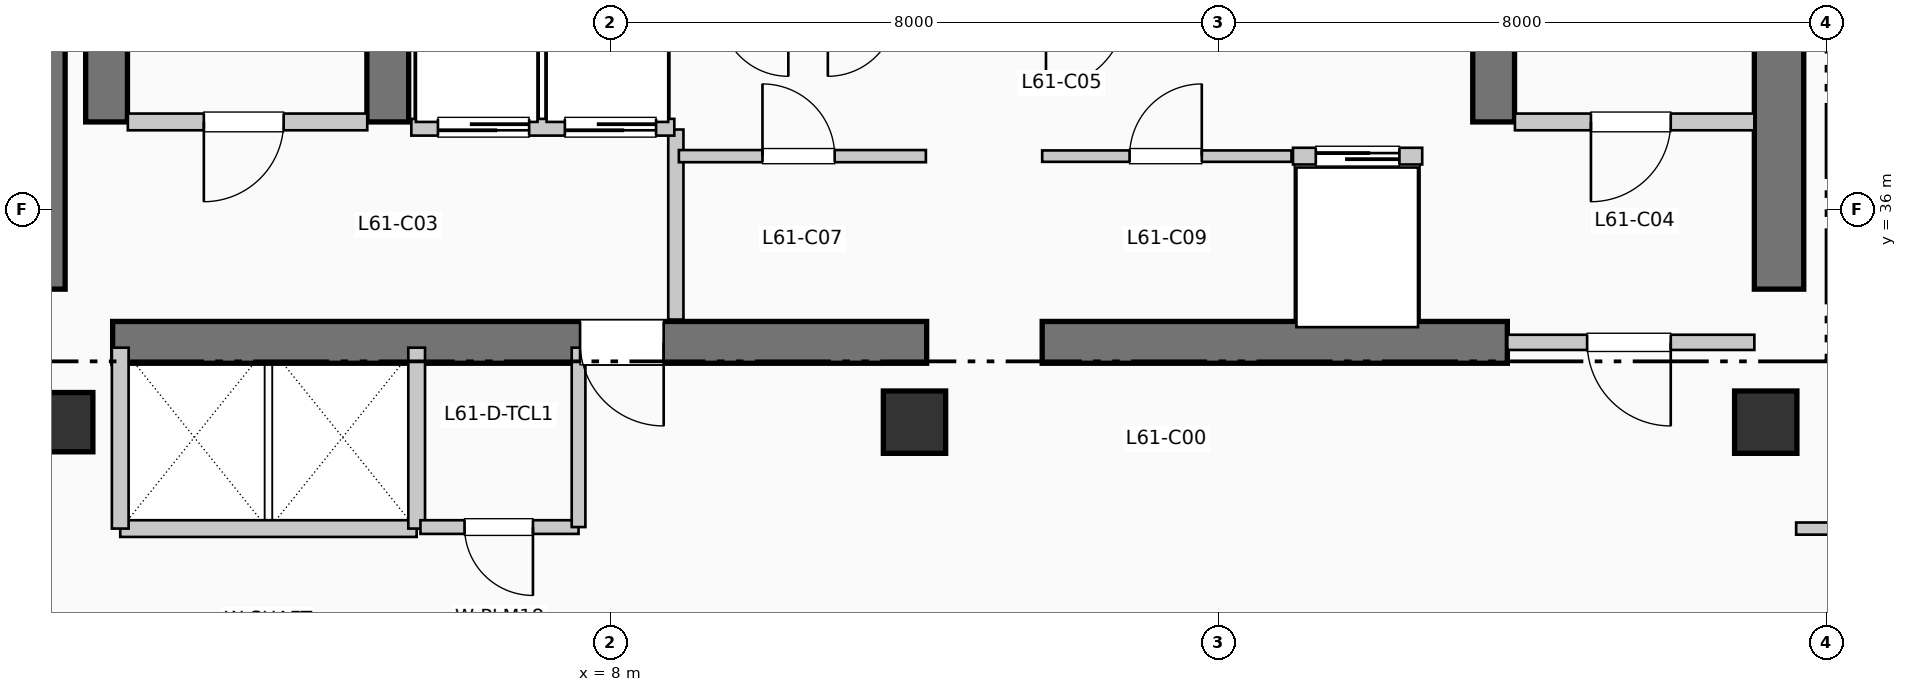
"""IFC4 building model, lengths in metres.
Left out: names, types, materials, properties, quantities, classifications, styles, units other than length and angle.
Written with IfcOpenShell. Run it as: python <this file> out.ifc"""

import sys

from ifc_helpers import new_model, si_unit, direction, frame, frame_2d, origin, origin_2d, place, context, subcontext, project, spatial, rectangle, extrude, element, fill, save


model = new_model("IFC4")
c1 = context("Model", 3, precision=1e-05, world=origin(), true_north=direction((0.0, 1.0)))
c2 = subcontext(c1, "Body", "Model", "MODEL_VIEW")
j1 = project(units=[si_unit("LENGTHUNIT", "METRE"), si_unit("PLANEANGLEUNIT", "RADIAN")], contexts=[c1])
p1 = place(None, origin())
s1 = spatial("IfcSite", under=j1, at=p1, CompositionType="ELEMENT")
p2 = place(p1, origin())
s2 = spatial("IfcBuilding", under=s1, at=p2, CompositionType="ELEMENT")
p3 = place(p2, frame((0.0, 0.0, 251.46)))
s3 = spatial("IfcBuildingStorey", under=s2, at=p3, CompositionType="ELEMENT", Elevation=251.46)
p4 = place(p3, frame((0.5, 34.95, 0.0), z_axis=(0.0, 0.0, 1.0), x_axis=(0.0, 1.0, 0.0)))
e1 = element("IfcWall", 1, at=p4, inside=s3, PredefinedType="SHEAR", context=c2, shape_type="SweptSolid", body=[
    extrude(rectangle(XDim=7.9, YDim=0.65, at=frame_2d((3.95, 0.0))), origin(), (0.0, 0.0, 1.0), 4.95),
])
p5 = place(p3, frame((23.375, 34.95, 0.0), z_axis=(0.0, 0.0, 1.0), x_axis=(0.0, 1.0, 0.0)))
e2 = element("IfcWall", 2, at=p5, inside=s3, PredefinedType="SHEAR", context=c2, shape_type="SweptSolid", body=[
    extrude(rectangle(XDim=10.64, YDim=0.65, at=frame_2d((5.32, 0.0))), origin(), (0.0, 0.0, 1.0), 4.95),
])
p6 = place(p3, frame((1.45, 34.25, 0.0), z_axis=(0.0, 0.0, 1.0), x_axis=(1.0, 0.0, 0.0)))
e3 = element("IfcWall", 3, at=p6, inside=s3, PredefinedType="SHEAR", context=c2, shape_type="SweptSolid", body=[
    extrude(rectangle(XDim=10.71, YDim=0.55, at=frame_2d((5.355, 0.0))), origin(), (0.0, 0.0, 1.0), 4.95),
])
p7 = place(p6, frame((7.25, 0.0, 0.0), z_axis=(0.0, 0.0, 1.0), x_axis=(-1.0, 0.0, 0.0)))
e4 = element("IfcOpeningElement", 4, at=p7, cuts=e3, PredefinedType="OPENING", context=c2, shape_type="SweptSolid", body=[
    extrude(rectangle(XDim=1.1, YDim=2.15, at=frame_2d((0.55, 1.075))), frame((0.0, 0.285, 0.0), z_axis=(0.0, -1.0, 0.0), x_axis=(1.0, 0.0, 0.0)), (0.0, 0.0, 1.0), 0.57),
])
p8 = place(p3, frame((13.68, 34.25, 0.0), z_axis=(0.0, 0.0, 1.0), x_axis=(1.0, 0.0, 0.0)))
e5 = element("IfcWall", 5, at=p8, inside=s3, PredefinedType="SHEAR", context=c2, shape_type="SweptSolid", body=[
    extrude(rectangle(XDim=6.12, YDim=0.55, at=frame_2d((3.06, 0.0))), origin(), (0.0, 0.0, 1.0), 4.95),
])
for number, where, z_axis, x_axis in (
    (6, (1.37, 37.15, 0.0), (0.0, 0.0, 1.0), (0.0, 1.0, 0.0)),
    (7, (5.07, 37.15, 0.0), (0.0, 0.0, 1.0), (0.0, 1.0, 0.0)),
    (8, (19.62, 37.15, 0.0), (0.0, 0.0, 1.0), (0.0, 1.0, 0.0)),
):
    element("IfcWall", number, at=place(p3, frame(where, z_axis=z_axis, x_axis=x_axis)), inside=s3, PredefinedType="SHEAR", context=c2, shape_type="SweptSolid", body=[
        extrude(rectangle(XDim=7.89, YDim=0.55, at=frame_2d((3.945, 0.0))), origin(), (0.0, 0.0, 1.0), 4.95),
    ])
p9 = place(p3, frame((0.8, 33.2, 0.0), z_axis=(0.0, 0.0, 1.0), x_axis=(1.0, 0.0, 0.0)))
e9 = element("IfcColumn", 9, at=p9, inside=s3, PredefinedType="COLUMN", context=c2, shape_type="SweptSolid", body=[
    extrude(rectangle(XDim=0.78, YDim=0.78, at=origin_2d()), origin(), (0.0, 0.0, 1.0), 4.95),
])
for number, where, z_axis, x_axis in (
    (10, (12.0, 33.2, 0.0), (0.0, 0.0, 1.0), (1.0, 0.0, 0.0)),
    (11, (23.2, 33.2, 0.0), (0.0, 0.0, 1.0), (1.0, 0.0, 0.0)),
):
    element("IfcColumn", number, at=place(p3, frame(where, z_axis=z_axis, x_axis=x_axis)), inside=s3, PredefinedType="COLUMN", context=c2, shape_type="SweptSolid", body=[
        extrude(rectangle(XDim=0.82, YDim=0.82, at=origin_2d()), origin(), (0.0, 0.0, 1.0), 4.95),
    ])
p10 = place(p3, frame((1.65, 37.15, 0.0), z_axis=(0.0, 0.0, 1.0), x_axis=(1.0, 0.0, 0.0)))
e12 = element("IfcWall", 12, at=p10, inside=s3, PredefinedType="PARTITIONING", context=c2, shape_type="SweptSolid", body=[
    extrude(rectangle(XDim=3.15, YDim=0.22, at=frame_2d((1.575, 0.0))), origin(), (0.0, 0.0, 1.0), 4.7),
])
p11 = place(p10, frame((2.05, 0.0, 0.0), z_axis=(0.0, 0.0, 1.0), x_axis=(-1.0, 0.0, 0.0)))
e13 = element("IfcOpeningElement", 13, at=p11, cuts=e12, PredefinedType="OPENING", context=c2, shape_type="SweptSolid", body=[
    extrude(rectangle(XDim=1.05, YDim=2.15, at=frame_2d((0.525, 1.075))), frame((0.0, 0.12, 0.0), z_axis=(0.0, -1.0, 0.0), x_axis=(1.0, 0.0, 0.0)), (0.0, 0.0, 1.0), 0.24),
])
p12 = place(p3, frame((8.86, 34.55, 0.0), z_axis=(0.0, 0.0, 1.0), x_axis=(0.0, 1.0, 0.0)))
e14 = element("IfcWall", 14, at=p12, inside=s3, PredefinedType="PARTITIONING", context=c2, shape_type="SweptSolid", body=[
    extrude(rectangle(XDim=2.5, YDim=0.2, at=frame_2d((1.25, 0.0))), origin(), (0.0, 0.0, 1.0), 4.7),
])
p13 = place(p3, frame((19.9, 37.15, 0.0), z_axis=(0.0, 0.0, 1.0), x_axis=(1.0, 0.0, 0.0)))
e15 = element("IfcWall", 15, at=p13, inside=s3, PredefinedType="PARTITIONING", context=c2, shape_type="SweptSolid", body=[
    extrude(rectangle(XDim=3.15, YDim=0.22, at=frame_2d((1.575, 0.0))), origin(), (0.0, 0.0, 1.0), 4.7),
])
p14 = place(p13, frame((2.05, 0.0, 0.0), z_axis=(0.0, 0.0, 1.0), x_axis=(-1.0, 0.0, 0.0)))
e16 = element("IfcOpeningElement", 16, at=p14, cuts=e15, PredefinedType="OPENING", context=c2, shape_type="SweptSolid", body=[
    extrude(rectangle(XDim=1.05, YDim=2.15, at=frame_2d((0.525, 1.075))), frame((0.0, 0.12, 0.0), z_axis=(0.0, -1.0, 0.0), x_axis=(1.0, 0.0, 0.0)), (0.0, 0.0, 1.0), 0.24),
])
p15 = place(p3, frame((19.8, 34.25, 0.0), z_axis=(0.0, 0.0, 1.0), x_axis=(1.0, 0.0, 0.0)))
e17 = element("IfcWall", 17, at=p15, inside=s3, PredefinedType="PARTITIONING", context=c2, shape_type="SweptSolid", body=[
    extrude(rectangle(XDim=3.25, YDim=0.2, at=frame_2d((1.625, 0.0))), origin(), (0.0, 0.0, 1.0), 4.7),
])
p16 = place(p15, frame((2.15, 0.0, 0.0), z_axis=(0.0, 0.0, 1.0), x_axis=(-1.0, 0.0, 0.0)))
e18 = element("IfcOpeningElement", 18, at=p16, cuts=e17, PredefinedType="OPENING", context=c2, shape_type="SweptSolid", body=[
    extrude(rectangle(XDim=1.1, YDim=2.15, at=frame_2d((0.55, 1.075))), frame((0.0, 0.11, 0.0), z_axis=(0.0, -1.0, 0.0), x_axis=(1.0, 0.0, 0.0)), (0.0, 0.0, 1.0), 0.22),
])
p17 = place(p3, frame((5.38, 37.08, 0.0), z_axis=(0.0, 0.0, 1.0), x_axis=(1.0, 0.0, 0.0)))
e19 = element("IfcWall", 19, at=p17, inside=s3, PredefinedType="PARTITIONING", context=c2, shape_type="SweptSolid", body=[
    extrude(rectangle(XDim=3.46, YDim=0.22, at=frame_2d((1.73, 0.0))), origin(), (0.0, 0.0, 1.0), 4.7),
])
p18 = place(p17, frame((1.55, 0.0, 0.0), z_axis=(0.0, 0.0, 1.0), x_axis=(-1.0, 0.0, 0.0)))
e20 = element("IfcOpeningElement", 20, at=p18, cuts=e19, PredefinedType="OPENING", context=c2, shape_type="SweptSolid", body=[
    extrude(rectangle(XDim=1.2, YDim=2.2, at=frame_2d((0.6, 1.1))), frame((0.0, 0.12, 0.0), z_axis=(0.0, -1.0, 0.0), x_axis=(1.0, 0.0, 0.0)), (0.0, 0.0, 1.0), 0.24),
])
p19 = place(p17, frame((3.22, 0.0, 0.0), z_axis=(0.0, 0.0, 1.0), x_axis=(-1.0, 0.0, 0.0)))
e21 = element("IfcOpeningElement", 21, at=p19, cuts=e19, PredefinedType="OPENING", context=c2, shape_type="SweptSolid", body=[
    extrude(rectangle(XDim=1.2, YDim=2.2, at=frame_2d((0.6, 1.1))), frame((0.0, 0.12, 0.0), z_axis=(0.0, -1.0, 0.0), x_axis=(1.0, 0.0, 0.0)), (0.0, 0.0, 1.0), 0.24),
])
p20 = place(p3, frame((1.55, 31.8, 0.0), z_axis=(0.0, 0.0, 1.0), x_axis=(1.0, 0.0, 0.0)))
e22 = element("IfcWall", 22, at=p20, inside=s3, PredefinedType="PARTITIONING", context=c2, shape_type="SweptSolid", body=[
    extrude(rectangle(XDim=3.9, YDim=0.22, at=frame_2d((1.95, 0.0))), origin(), (0.0, 0.0, 1.0), 4.7),
])
for number, where, z_axis, x_axis in (
    (23, (1.55, 31.8, 0.0), (0.0, 0.0, 1.0), (0.0, 1.0, 0.0)),
    (24, (5.45, 31.8, 0.0), (0.0, 0.0, 1.0), (0.0, 1.0, 0.0)),
):
    element("IfcWall", number, at=place(p3, frame(where, z_axis=z_axis, x_axis=x_axis)), inside=s3, PredefinedType="PARTITIONING", context=c2, shape_type="SweptSolid", body=[
        extrude(rectangle(XDim=2.38, YDim=0.22, at=frame_2d((1.19, 0.0))), origin(), (0.0, 0.0, 1.0), 4.7),
    ])
p21 = place(p3, frame((5.5, 31.82, 0.0), z_axis=(0.0, 0.0, 1.0), x_axis=(1.0, 0.0, 0.0)))
e25 = element("IfcWall", 25, at=p21, inside=s3, PredefinedType="PLUMBINGWALL", context=c2, shape_type="SweptSolid", body=[
    extrude(rectangle(XDim=2.08, YDim=0.18, at=frame_2d((1.04, 0.0))), origin(), (0.0, 0.0, 1.0), 4.7),
])
p22 = place(p21, frame((1.48, 0.0, 0.0), z_axis=(0.0, 0.0, 1.0), x_axis=(-1.0, 0.0, 0.0)))
e26 = element("IfcOpeningElement", 26, at=p22, cuts=e25, PredefinedType="OPENING", context=c2, shape_type="SweptSolid", body=[
    extrude(rectangle(XDim=0.9, YDim=2.1, at=frame_2d((0.45, 1.05))), frame((0.0, 0.1, 0.0), z_axis=(0.0, -1.0, 0.0), x_axis=(1.0, 0.0, 0.0)), (0.0, 0.0, 1.0), 0.2),
])
p23 = place(p3, frame((7.58, 31.82, 0.0), z_axis=(0.0, 0.0, 1.0), x_axis=(0.0, 1.0, 0.0)))
e27 = element("IfcWall", 27, at=p23, inside=s3, PredefinedType="PLUMBINGWALL", context=c2, shape_type="SweptSolid", body=[
    extrude(rectangle(XDim=2.36, YDim=0.18, at=frame_2d((1.18, 0.0))), origin(), (0.0, 0.0, 1.0), 4.7),
])
p24 = place(p3, frame((8.9, 36.7, 0.0), z_axis=(0.0, 0.0, 1.0), x_axis=(1.0, 0.0, 0.0)))
e28 = element("IfcWall", 28, at=p24, inside=s3, PredefinedType="PARTITIONING", context=c2, shape_type="SweptSolid", body=[
    extrude(rectangle(XDim=3.25, YDim=0.16, at=frame_2d((1.625, 0.0))), origin(), (0.0, 0.0, 1.0), 4.7),
])
p25 = place(p24, frame((1.1, 0.0, 0.0)))
e29 = element("IfcOpeningElement", 29, at=p25, cuts=e28, PredefinedType="OPENING", context=c2, shape_type="SweptSolid", body=[
    extrude(rectangle(XDim=0.95, YDim=2.15, at=frame_2d((0.475, 1.075))), frame((0.0, 0.09, 0.0), z_axis=(0.0, -1.0, 0.0), x_axis=(1.0, 0.0, 0.0)), (0.0, 0.0, 1.0), 0.18),
])
p26 = place(p3, frame((13.68, 36.7, 0.0), z_axis=(0.0, 0.0, 1.0), x_axis=(1.0, 0.0, 0.0)))
e30 = element("IfcWall", 30, at=p26, inside=s3, PredefinedType="PARTITIONING", context=c2, shape_type="SweptSolid", body=[
    extrude(rectangle(XDim=3.28, YDim=0.15, at=frame_2d((1.64, 0.0))), origin(), (0.0, 0.0, 1.0), 4.7),
])
p27 = place(p26, frame((1.15, 0.0, 0.0)))
e31 = element("IfcOpeningElement", 31, at=p27, cuts=e30, PredefinedType="OPENING", context=c2, shape_type="SweptSolid", body=[
    extrude(rectangle(XDim=0.95, YDim=2.15, at=frame_2d((0.475, 1.075))), frame((0.0, 0.085, 0.0), z_axis=(0.0, -1.0, 0.0), x_axis=(1.0, 0.0, 0.0)), (0.0, 0.0, 1.0), 0.17),
])
p28 = place(p3, frame((16.98, 36.7, 0.0), z_axis=(0.0, 0.0, 1.0), x_axis=(1.0, 0.0, 0.0)))
e32 = element("IfcWall", 32, at=p28, inside=s3, PredefinedType="PARTITIONING", context=c2, shape_type="SweptSolid", body=[
    extrude(rectangle(XDim=1.7, YDim=0.22, at=frame_2d((0.85, 0.0))), origin(), (0.0, 0.0, 1.0), 4.7),
])
p29 = place(p28, frame((0.3, 0.0, 0.0)))
e33 = element("IfcOpeningElement", 33, at=p29, cuts=e32, PredefinedType="OPENING", context=c2, shape_type="SweptSolid", body=[
    extrude(rectangle(XDim=1.1, YDim=2.2, at=frame_2d((0.55, 1.1))), frame((0.0, 0.12, 0.0), z_axis=(0.0, -1.0, 0.0), x_axis=(1.0, 0.0, 0.0)), (0.0, 0.0, 1.0), 0.24),
])
p30 = place(p3, frame((23.6, 31.8, 0.0), z_axis=(0.0, 0.0, 1.0), x_axis=(1.0, 0.0, 0.0)))
e34 = element("IfcWall", 34, at=p30, inside=s3, PredefinedType="PARTITIONING", context=c2, shape_type="SweptSolid", body=[
    extrude(rectangle(XDim=25.45, YDim=0.16, at=frame_2d((12.725, 0.0))), origin(), (0.0, 0.0, 1.0), 4.7),
])
p31 = place(p30, frame((2.5, 0.0, 0.0)))
e35 = element("IfcOpeningElement", 35, at=p31, cuts=e34, PredefinedType="OPENING", context=c2, shape_type="SweptSolid", body=[
    extrude(rectangle(XDim=0.95, YDim=2.1, at=frame_2d((0.475, 1.05))), frame((0.0, 0.09, 0.0), z_axis=(0.0, -1.0, 0.0), x_axis=(1.0, 0.0, 0.0)), (0.0, 0.0, 1.0), 0.18),
])
p32 = place(p30, frame((14.725, 0.0, 0.0)))
e36 = element("IfcOpeningElement", 36, at=p32, cuts=e34, PredefinedType="OPENING", context=c2, shape_type="SweptSolid", body=[
    extrude(rectangle(XDim=0.95, YDim=2.1, at=frame_2d((0.475, 1.05))), frame((0.0, 0.09, 0.0), z_axis=(0.0, -1.0, 0.0), x_axis=(1.0, 0.0, 0.0)), (0.0, 0.0, 1.0), 0.18),
])
p33 = place(p11, origin())
e37 = element("IfcDoor", 37, at=p33, inside=s3, OperationType="SINGLE_SWING_LEFT", PredefinedType="DOOR", context=c2, shape_type="SweptSolid", body=[
    extrude(rectangle(XDim=1.05, YDim=2.15, at=frame_2d((0.525, 1.075))), frame((0.0, 0.025, 0.0), z_axis=(0.0, -1.0, 0.0), x_axis=(1.0, 0.0, 0.0)), (0.0, 0.0, 1.0), 0.05),
])
fill(e13, e37)
p34 = place(p7, origin())
e38 = element("IfcDoor", 38, at=p34, inside=s3, OperationType="SINGLE_SWING_RIGHT", PredefinedType="DOOR", context=c2, shape_type="SweptSolid", body=[
    extrude(rectangle(XDim=1.1, YDim=2.15, at=frame_2d((0.55, 1.075))), frame((0.0, 0.025, 0.0), z_axis=(0.0, -1.0, 0.0), x_axis=(1.0, 0.0, 0.0)), (0.0, 0.0, 1.0), 0.05),
])
fill(e4, e38)
p35 = place(p14, origin())
e39 = element("IfcDoor", 39, at=p35, inside=s3, OperationType="SINGLE_SWING_LEFT", PredefinedType="DOOR", context=c2, shape_type="SweptSolid", body=[
    extrude(rectangle(XDim=1.05, YDim=2.15, at=frame_2d((0.525, 1.075))), frame((0.0, 0.025, 0.0), z_axis=(0.0, -1.0, 0.0), x_axis=(1.0, 0.0, 0.0)), (0.0, 0.0, 1.0), 0.05),
])
fill(e16, e39)
p36 = place(p16, origin())
e40 = element("IfcDoor", 40, at=p36, inside=s3, OperationType="SINGLE_SWING_RIGHT", PredefinedType="DOOR", context=c2, shape_type="SweptSolid", body=[
    extrude(rectangle(XDim=1.1, YDim=2.15, at=frame_2d((0.55, 1.075))), frame((0.0, 0.025, 0.0), z_axis=(0.0, -1.0, 0.0), x_axis=(1.0, 0.0, 0.0)), (0.0, 0.0, 1.0), 0.05),
])
fill(e18, e40)
p37 = place(p18, origin())
e41 = element("IfcDoor", 41, at=p37, inside=s3, OperationType="SLIDING_TO_RIGHT", PredefinedType="DOOR", context=c2, shape_type="SweptSolid", body=[
    extrude(rectangle(XDim=1.2, YDim=2.2, at=frame_2d((0.6, 1.1))), frame((0.0, 0.025, 0.0), z_axis=(0.0, -1.0, 0.0), x_axis=(1.0, 0.0, 0.0)), (0.0, 0.0, 1.0), 0.05),
])
fill(e20, e41)
p38 = place(p19, origin())
e42 = element("IfcDoor", 42, at=p38, inside=s3, OperationType="SLIDING_TO_RIGHT", PredefinedType="DOOR", context=c2, shape_type="SweptSolid", body=[
    extrude(rectangle(XDim=1.2, YDim=2.2, at=frame_2d((0.6, 1.1))), frame((0.0, 0.025, 0.0), z_axis=(0.0, -1.0, 0.0), x_axis=(1.0, 0.0, 0.0)), (0.0, 0.0, 1.0), 0.05),
])
fill(e21, e42)
p39 = place(p22, origin())
e43 = element("IfcDoor", 43, at=p39, inside=s3, OperationType="SINGLE_SWING_RIGHT", PredefinedType="DOOR", context=c2, shape_type="SweptSolid", body=[
    extrude(rectangle(XDim=0.9, YDim=2.1, at=frame_2d((0.45, 1.05))), frame((0.0, 0.025, 0.0), z_axis=(0.0, -1.0, 0.0), x_axis=(1.0, 0.0, 0.0)), (0.0, 0.0, 1.0), 0.05),
])
fill(e26, e43)
p40 = place(p25, origin())
e44 = element("IfcDoor", 44, at=p40, inside=s3, OperationType="SINGLE_SWING_LEFT", PredefinedType="DOOR", context=c2, shape_type="SweptSolid", body=[
    extrude(rectangle(XDim=0.95, YDim=2.15, at=frame_2d((0.475, 1.075))), frame((0.0, 0.025, 0.0), z_axis=(0.0, -1.0, 0.0), x_axis=(1.0, 0.0, 0.0)), (0.0, 0.0, 1.0), 0.05),
])
fill(e29, e44)
p41 = place(p27, origin())
e45 = element("IfcDoor", 45, at=p41, inside=s3, OperationType="SINGLE_SWING_RIGHT", PredefinedType="DOOR", context=c2, shape_type="SweptSolid", body=[
    extrude(rectangle(XDim=0.95, YDim=2.15, at=frame_2d((0.475, 1.075))), frame((0.0, 0.025, 0.0), z_axis=(0.0, -1.0, 0.0), x_axis=(1.0, 0.0, 0.0)), (0.0, 0.0, 1.0), 0.05),
])
fill(e31, e45)
p42 = place(p29, origin())
e46 = element("IfcDoor", 46, at=p42, inside=s3, OperationType="SLIDING_TO_LEFT", PredefinedType="DOOR", context=c2, shape_type="SweptSolid", body=[
    extrude(rectangle(XDim=1.1, YDim=2.2, at=frame_2d((0.55, 1.1))), frame((0.0, 0.025, 0.0), z_axis=(0.0, -1.0, 0.0), x_axis=(1.0, 0.0, 0.0)), (0.0, 0.0, 1.0), 0.05),
])
fill(e33, e46)
save(model, sys.argv[1])
